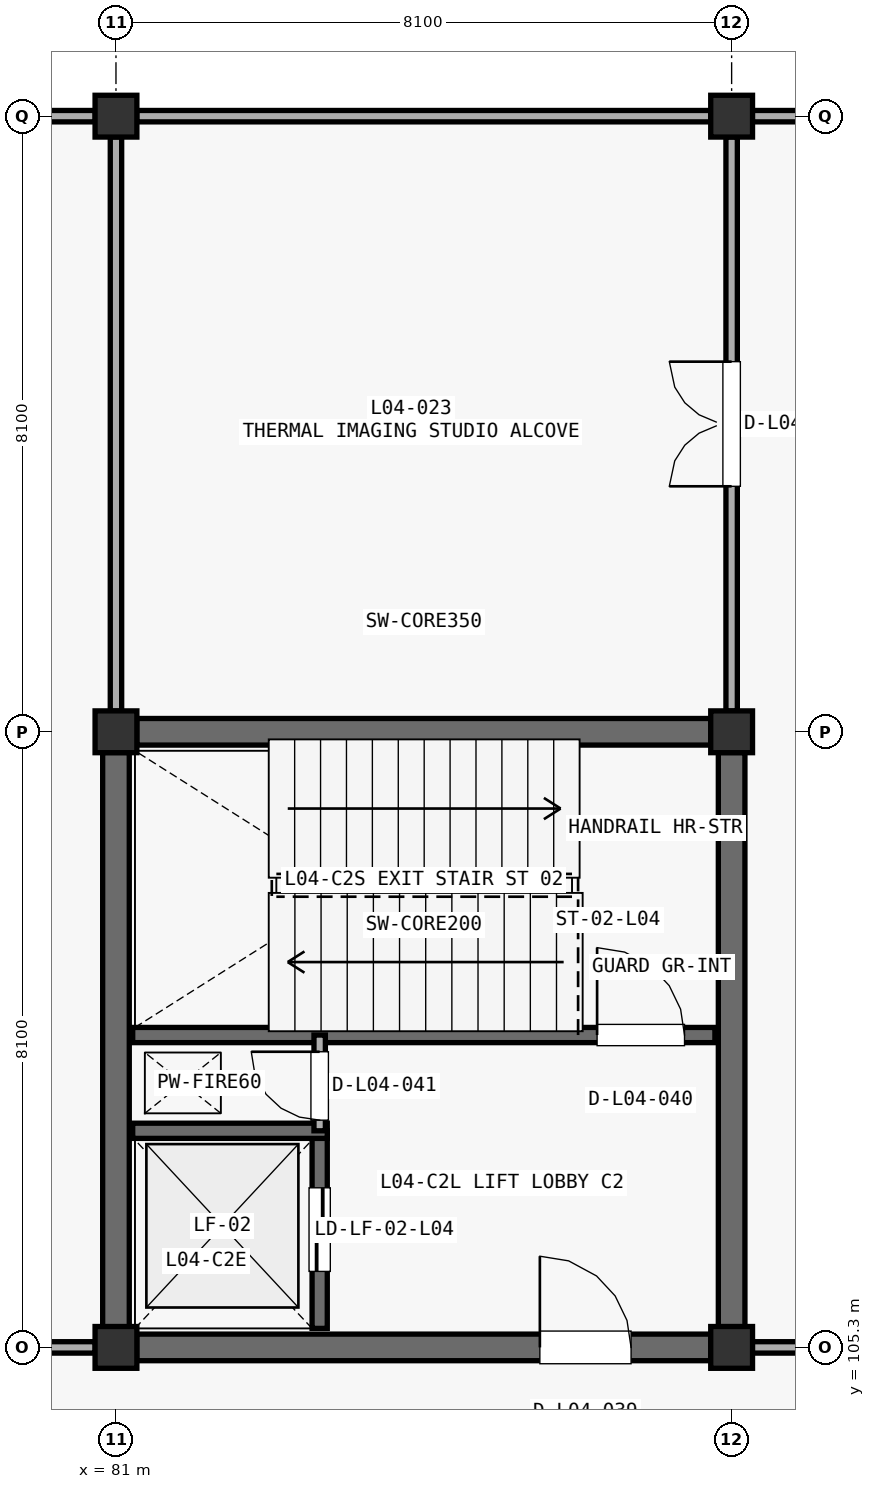
"""IFC4 building model, lengths in metres.
Left out: names, types, materials, properties, quantities, classifications, styles, units other than length and angle.
Written with IfcOpenShell. Run it as: python <this file> out.ifc"""

import sys

from ifc_helpers import new_model, si_unit, direction, frame, frame_2d, origin, origin_2d, place, context, subcontext, project, spatial, rectangle, extrude, element, fill, save


model = new_model("IFC4")
c1 = context("Model", 3, precision=1e-05, world=origin(), true_north=direction((0.0, 1.0)))
c2 = subcontext(c1, "Body", "Model", "MODEL_VIEW")
j1 = project(units=[si_unit("LENGTHUNIT", "METRE"), si_unit("PLANEANGLEUNIT", "RADIAN")], contexts=[c1])
p1 = place(None, origin())
s1 = spatial("IfcSite", under=j1, at=p1, CompositionType="ELEMENT")
p2 = place(p1, origin())
s2 = spatial("IfcBuilding", under=s1, at=p2, CompositionType="ELEMENT")
p3 = place(p2, frame((0.0, 0.0, 18.53)))
s3 = spatial("IfcBuildingStorey", under=s2, at=p3, CompositionType="ELEMENT", Elevation=18.53)
for number, where, z_axis, x_axis in (
    (1, (81.0, 105.3, 0.0), (0.0, 0.0, 1.0), (1.0, 0.0, 0.0)),
    (2, (81.0, 113.4, 0.0), (0.0, 0.0, 1.0), (1.0, 0.0, 0.0)),
    (3, (81.0, 121.5, 0.0), (0.0, 0.0, 1.0), (1.0, 0.0, 0.0)),
    (4, (89.1, 105.3, 0.0), (0.0, 0.0, 1.0), (1.0, 0.0, 0.0)),
    (5, (89.1, 113.4, 0.0), (0.0, 0.0, 1.0), (1.0, 0.0, 0.0)),
    (6, (89.1, 121.5, 0.0), (0.0, 0.0, 1.0), (1.0, 0.0, 0.0)),
):
    element("IfcColumn", number, at=place(p3, frame(where, z_axis=z_axis, x_axis=x_axis)), inside=s3, PredefinedType="COLUMN", context=c2, shape_type="SweptSolid", body=[
        extrude(rectangle(XDim=0.55, YDim=0.55, at=origin_2d()), origin(), (0.0, 0.0, 1.0), 4.42),
    ])
for number, where, z_axis, x_axis in (
    (7, (81.273, 113.4, 0.0), (0.0, 0.0, 1.0), (1.0, 0.0, 0.0)),
    (8, (81.0, 105.573, 0.0), (0.0, 0.0, 1.0), (0.0, 1.0, 0.0)),
    (9, (89.1, 105.573, 0.0), (0.0, 0.0, 1.0), (0.0, 1.0, 0.0)),
):
    element("IfcWall", number, at=place(p3, frame(where, z_axis=z_axis, x_axis=x_axis)), inside=s3, PredefinedType="SHEAR", context=c2, shape_type="SweptSolid", body=[
        extrude(rectangle(XDim=7.554, YDim=0.35, at=frame_2d((3.777, 0.0))), origin(), (0.0, 0.0, 1.0), 4.162),
    ])
p4 = place(p3, frame((81.273, 105.3, 0.0), z_axis=(0.0, 0.0, 1.0), x_axis=(1.0, 0.0, 0.0)))
e10 = element("IfcWall", 10, at=p4, inside=s3, PredefinedType="SHEAR", context=c2, shape_type="SweptSolid", body=[
    extrude(rectangle(XDim=7.554, YDim=0.35, at=frame_2d((3.777, 0.0))), origin(), (0.0, 0.0, 1.0), 4.162),
])
p5 = place(p4, frame((5.304, 0.0, 0.0)))
e11 = element("IfcOpeningElement", 11, at=p5, cuts=e10, PredefinedType="OPENING", context=c2, shape_type="SweptSolid", body=[
    extrude(rectangle(XDim=1.2, YDim=2.2, at=frame_2d((0.6, 1.1))), frame((0.0, 0.185, 0.0), z_axis=(0.0, -1.0, 0.0), x_axis=(1.0, 0.0, 0.0)), (0.0, 0.0, 1.0), 0.37),
])
p6 = place(p3, frame((81.22, 109.41, 0.0), z_axis=(0.0, 0.0, 1.0), x_axis=(1.0, 0.0, 0.0)))
e12 = element("IfcWall", 12, at=p6, inside=s3, PredefinedType="SHEAR", context=c2, shape_type="SweptSolid", body=[
    extrude(rectangle(XDim=7.66, YDim=0.2, at=frame_2d((3.83, 0.0))), origin(), (0.0, 0.0, 1.0), 4.162),
])
p7 = place(p6, frame((6.11, 0.0, 0.0)))
e13 = element("IfcOpeningElement", 13, at=p7, cuts=e12, PredefinedType="OPENING", context=c2, shape_type="SweptSolid", body=[
    extrude(rectangle(XDim=1.15, YDim=2.2, at=frame_2d((0.575, 1.1))), frame((0.0, 0.11, 0.0), z_axis=(0.0, -1.0, 0.0), x_axis=(1.0, 0.0, 0.0)), (0.0, 0.0, 1.0), 0.22),
])
p8 = place(p3, frame((83.68, 105.55, 0.0), z_axis=(0.0, 0.0, 1.0), x_axis=(0.0, 1.0, 0.0)))
e14 = element("IfcWall", 14, at=p8, inside=s3, PredefinedType="SHEAR", context=c2, shape_type="SweptSolid", body=[
    extrude(rectangle(XDim=2.6, YDim=0.2, at=frame_2d((1.3, 0.0))), origin(), (0.0, 0.0, 1.0), 4.162),
])
p9 = place(p8, frame((0.75, 0.0, 0.0)))
e15 = element("IfcOpeningElement", 15, at=p9, cuts=e14, PredefinedType="OPENING", context=c2, shape_type="SweptSolid", body=[
    extrude(rectangle(XDim=1.1, YDim=2.2, at=frame_2d((0.55, 1.1))), frame((0.0, 0.11, 0.0), z_axis=(0.0, -1.0, 0.0), x_axis=(1.0, 0.0, 0.0)), (0.0, 0.0, 1.0), 0.22),
])
p10 = place(p3, frame((81.22, 108.15, 0.0), z_axis=(0.0, 0.0, 1.0), x_axis=(1.0, 0.0, 0.0)))
e16 = element("IfcWall", 16, at=p10, inside=s3, PredefinedType="SHEAR", context=c2, shape_type="SweptSolid", body=[
    extrude(rectangle(XDim=2.56, YDim=0.2, at=frame_2d((1.28, 0.0))), origin(), (0.0, 0.0, 1.0), 4.162),
])
p11 = place(p3, frame((83.68, 108.15, 0.0), z_axis=(0.0, 0.0, 1.0), x_axis=(0.0, 1.0, 0.0)))
e17 = element("IfcWall", 17, at=p11, inside=s3, PredefinedType="PARTITIONING", context=c2, shape_type="SweptSolid", body=[
    extrude(rectangle(XDim=1.26, YDim=0.15, at=frame_2d((0.63, 0.0))), origin(), (0.0, 0.0, 1.0), 4.162),
])
p12 = place(p11, frame((0.14, 0.0, 0.0)))
e18 = element("IfcOpeningElement", 18, at=p12, cuts=e17, PredefinedType="OPENING", context=c2, shape_type="SweptSolid", body=[
    extrude(rectangle(XDim=0.9, YDim=2.15, at=frame_2d((0.45, 1.075))), frame((0.0, 0.085, 0.0), z_axis=(0.0, -1.0, 0.0), x_axis=(1.0, 0.0, 0.0)), (0.0, 0.0, 1.0), 0.17),
])
p13 = place(p3, frame((73.173, 105.3, 0.0), z_axis=(0.0, 0.0, 1.0), x_axis=(1.0, 0.0, 0.0)))
e19 = element("IfcWall", 19, at=p13, inside=s3, PredefinedType="PARTITIONING", context=c2, shape_type="SweptSolid", body=[
    extrude(rectangle(XDim=7.554, YDim=0.15, at=frame_2d((3.777, 0.0))), origin(), (0.0, 0.0, 1.0), 3.562),
])
p14 = place(p13, frame((3.077, 0.0, 0.0)))
e20 = element("IfcOpeningElement", 20, at=p14, cuts=e19, PredefinedType="OPENING", context=c2, shape_type="SweptSolid", body=[
    extrude(rectangle(XDim=1.4, YDim=2.2, at=frame_2d((0.7, 1.1))), frame((0.0, 0.085, 0.0), z_axis=(0.0, -1.0, 0.0), x_axis=(1.0, 0.0, 0.0)), (0.0, 0.0, 1.0), 0.17),
])
p15 = place(p3, frame((81.0, 113.673, 0.0), z_axis=(0.0, 0.0, 1.0), x_axis=(0.0, 1.0, 0.0)))
e21 = element("IfcWall", 21, at=p15, inside=s3, PredefinedType="PARTITIONING", context=c2, shape_type="SweptSolid", body=[
    extrude(rectangle(XDim=7.554, YDim=0.15, at=frame_2d((3.777, 0.0))), origin(), (0.0, 0.0, 1.0), 3.212),
])
p16 = place(p3, frame((73.173, 121.5, 0.0), z_axis=(0.0, 0.0, 1.0), x_axis=(1.0, 0.0, 0.0)))
e22 = element("IfcWall", 22, at=p16, inside=s3, PredefinedType="PARTITIONING", context=c2, shape_type="SweptSolid", body=[
    extrude(rectangle(XDim=7.554, YDim=0.15, at=frame_2d((3.777, 0.0))), origin(), (0.0, 0.0, 1.0), 3.747),
])
p17 = place(p3, frame((89.373, 105.3, 0.0), z_axis=(0.0, 0.0, 1.0), x_axis=(1.0, 0.0, 0.0)))
e23 = element("IfcWall", 23, at=p17, inside=s3, PredefinedType="PARTITIONING", context=c2, shape_type="SweptSolid", body=[
    extrude(rectangle(XDim=7.554, YDim=0.15, at=frame_2d((3.777, 0.0))), origin(), (0.0, 0.0, 1.0), 3.212),
])
p18 = place(p17, frame((3.077, 0.0, 0.0)))
e24 = element("IfcOpeningElement", 24, at=p18, cuts=e23, PredefinedType="OPENING", context=c2, shape_type="SweptSolid", body=[
    extrude(rectangle(XDim=1.4, YDim=2.2, at=frame_2d((0.7, 1.1))), frame((0.0, 0.085, 0.0), z_axis=(0.0, -1.0, 0.0), x_axis=(1.0, 0.0, 0.0)), (0.0, 0.0, 1.0), 0.17),
])
p19 = place(p3, frame((89.1, 113.673, 0.0), z_axis=(0.0, 0.0, 1.0), x_axis=(0.0, 1.0, 0.0)))
e25 = element("IfcWall", 25, at=p19, inside=s3, PredefinedType="PARTITIONING", context=c2, shape_type="SweptSolid", body=[
    extrude(rectangle(XDim=7.554, YDim=0.15, at=frame_2d((3.777, 0.0))), origin(), (0.0, 0.0, 1.0), 3.512),
])
p20 = place(p19, frame((2.957, 0.0, 0.0)))
e26 = element("IfcOpeningElement", 26, at=p20, cuts=e25, PredefinedType="OPENING", context=c2, shape_type="SweptSolid", body=[
    extrude(rectangle(XDim=1.64, YDim=2.25, at=frame_2d((0.82, 1.125))), frame((0.0, 0.085, 0.0), z_axis=(0.0, -1.0, 0.0), x_axis=(1.0, 0.0, 0.0)), (0.0, 0.0, 1.0), 0.17),
])
p21 = place(p3, frame((89.373, 121.5, 0.0), z_axis=(0.0, 0.0, 1.0), x_axis=(1.0, 0.0, 0.0)))
e27 = element("IfcWall", 27, at=p21, inside=s3, PredefinedType="PARTITIONING", context=c2, shape_type="SweptSolid", body=[
    extrude(rectangle(XDim=7.554, YDim=0.15, at=frame_2d((3.777, 0.0))), origin(), (0.0, 0.0, 1.0), 3.512),
])
p22 = place(p3, frame((81.273, 121.5, 0.0), z_axis=(0.0, 0.0, 1.0), x_axis=(1.0, 0.0, 0.0)))
e28 = element("IfcWall", 28, at=p22, inside=s3, PredefinedType="PARTITIONING", context=c2, shape_type="SweptSolid", body=[
    extrude(rectangle(XDim=7.554, YDim=0.15, at=frame_2d((3.777, 0.0))), origin(), (0.0, 0.0, 1.0), 3.412),
])
p23 = place(p5, origin())
e29 = element("IfcDoor", 29, at=p23, inside=s3, OperationType="SINGLE_SWING_LEFT", PredefinedType="DOOR", context=c2, shape_type="SweptSolid", body=[
    extrude(rectangle(XDim=1.2, YDim=2.2, at=frame_2d((0.6, 1.1))), frame((0.0, 0.025, 0.0), z_axis=(0.0, -1.0, 0.0), x_axis=(1.0, 0.0, 0.0)), (0.0, 0.0, 1.0), 0.05),
])
fill(e11, e29)
p24 = place(p7, origin())
e30 = element("IfcDoor", 30, at=p24, inside=s3, OperationType="SINGLE_SWING_LEFT", PredefinedType="DOOR", context=c2, shape_type="SweptSolid", body=[
    extrude(rectangle(XDim=1.15, YDim=2.2, at=frame_2d((0.575, 1.1))), frame((0.0, 0.025, 0.0), z_axis=(0.0, -1.0, 0.0), x_axis=(1.0, 0.0, 0.0)), (0.0, 0.0, 1.0), 0.05),
])
fill(e13, e30)
p25 = place(p9, origin())
e31 = element("IfcDoor", 31, at=p25, inside=s3, OperationType="SLIDING_TO_LEFT", PredefinedType="DOOR", context=c2, shape_type="SweptSolid", body=[
    extrude(rectangle(XDim=1.1, YDim=2.2, at=frame_2d((0.55, 1.1))), frame((0.0, 0.025, 0.0), z_axis=(0.0, -1.0, 0.0), x_axis=(1.0, 0.0, 0.0)), (0.0, 0.0, 1.0), 0.05),
])
fill(e15, e31)
p26 = place(p12, origin())
e32 = element("IfcDoor", 32, at=p26, inside=s3, OperationType="SINGLE_SWING_RIGHT", PredefinedType="DOOR", context=c2, shape_type="SweptSolid", body=[
    extrude(rectangle(XDim=0.9, YDim=2.15, at=frame_2d((0.45, 1.075))), frame((0.0, 0.025, 0.0), z_axis=(0.0, -1.0, 0.0), x_axis=(1.0, 0.0, 0.0)), (0.0, 0.0, 1.0), 0.05),
])
fill(e18, e32)
p27 = place(p20, origin())
e33 = element("IfcDoor", 33, at=p27, inside=s3, OperationType="DOUBLE_SWING_LEFT", PredefinedType="DOOR", context=c2, shape_type="SweptSolid", body=[
    extrude(rectangle(XDim=1.64, YDim=2.25, at=frame_2d((0.82, 1.125))), frame((0.0, 0.025, 0.0), z_axis=(0.0, -1.0, 0.0), x_axis=(1.0, 0.0, 0.0)), (0.0, 0.0, 1.0), 0.05),
])
fill(e26, e33)
save(model, sys.argv[1])
